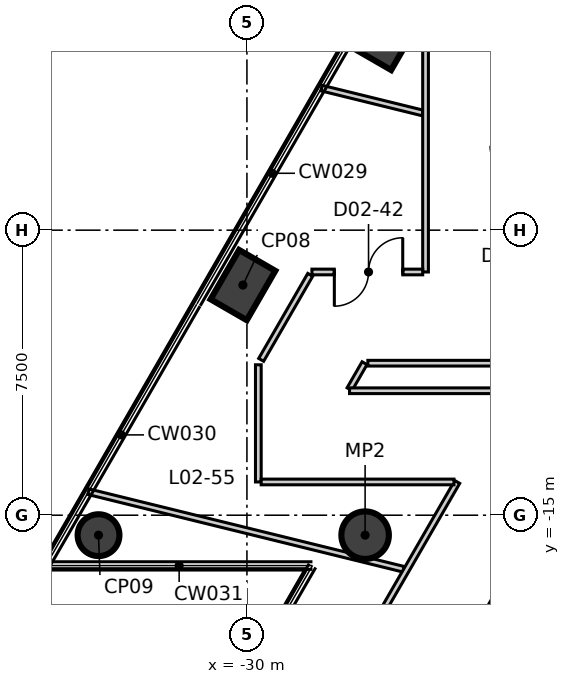
"""IFC4 building model, lengths in metres.
Left out: names, types, materials, properties, quantities, classifications, styles, units other than length and angle.
Written with IfcOpenShell. Run it as: python <this file> out.ifc"""

import sys

from ifc_helpers import new_model, si_unit, direction, frame, frame_2d, origin, origin_2d, place, context, subcontext, project, spatial, rectangle, circle, extrude, element, fill, save


model = new_model("IFC4")
c1 = context("Model", 3, precision=1e-05, world=origin(), true_north=direction((0.0, 1.0)))
c2 = subcontext(c1, "Body", "Model", "MODEL_VIEW")
j1 = project(units=[si_unit("LENGTHUNIT", "METRE"), si_unit("PLANEANGLEUNIT", "RADIAN")], contexts=[c1])
p1 = place(None, origin())
s1 = spatial("IfcSite", under=j1, at=p1, CompositionType="ELEMENT")
p2 = place(p1, origin())
s2 = spatial("IfcBuilding", under=s1, at=p2, CompositionType="ELEMENT")
p3 = place(p2, frame((0.0, 0.0, 14.5)))
s3 = spatial("IfcBuildingStorey", under=s2, at=p3, CompositionType="ELEMENT", Elevation=14.5)
for number, where, z_axis, x_axis in (
    (1, (-26.306, -2.362, -0.4), (0.0, 0.0, 1.0), (0.5, 0.866, 0.0)),
    (2, (-30.105, -8.944, -0.4), (0.0, 0.0, 1.0), (0.5, 0.866, 0.0)),
):
    element("IfcColumn", number, at=place(p3, frame(where, z_axis=z_axis, x_axis=x_axis)), inside=s3, PredefinedType="COLUMN", context=c2, shape_type="SweptSolid", body=[
        extrude(rectangle(XDim=1.5, YDim=1.1, at=origin_2d()), origin(), (0.0, 0.0, 1.0), 5.4),
    ])
p4 = place(p3, frame((-33.905, -15.525, -0.4), z_axis=(0.0, 0.0, 1.0), x_axis=(0.5, 0.866025403784, 0.0)))
e3 = element("IfcColumn", 3, at=p4, inside=s3, PredefinedType="COLUMN", context=c2, shape_type="SweptSolid", body=[
    extrude(circle(Radius=0.55, at=origin_2d()), origin(), (0.0, 0.0, 1.0), 5.4),
])
p5 = place(p3, frame((-26.89, -15.525, -0.4), z_axis=(0.0, 0.0, 1.0), x_axis=(1.0, 0.0, 0.0)))
e4 = element("IfcColumn", 4, at=p5, inside=s3, PredefinedType="COLUMN", context=c2, shape_type="SweptSolid", body=[
    extrude(circle(Radius=0.625, at=origin_2d()), origin(), (0.0, 0.0, 1.0), 5.4),
])
p6 = place(p3, frame((-34.169, -14.382, 0.0), z_axis=(0.0, 0.0, 1.0), x_axis=(0.971037336003, -0.238927796809, 0.0)))
e5 = element("IfcWall", 5, at=p6, inside=s3, PredefinedType="PARTITIONING", context=c2, shape_type="SweptSolid", body=[
    extrude(rectangle(XDim=8.538, YDim=0.15, at=frame_2d((4.269, 0.0))), origin(), (0.0, 0.0, 1.0), 4.1),
])
p7 = place(p3, frame((-29.358, -22.6, 0.0), z_axis=(0.0, 0.0, 1.0), x_axis=(0.499903869937, 0.866080897389, 0.0)))
e6 = element("IfcWall", 6, at=p7, inside=s3, PredefinedType="PARTITIONING", context=c2, shape_type="SweptSolid", body=[
    extrude(rectangle(XDim=9.786, YDim=0.15, at=frame_2d((4.893, 0.0))), origin(), (0.0, 0.0, 1.0), 5.0),
])
p8 = place(p7, frame((3.056, 0.0, 0.0)))
e7 = element("IfcOpeningElement", 7, at=p8, cuts=e6, PredefinedType="OPENING", context=c2, shape_type="SweptSolid", body=[
    extrude(rectangle(XDim=1.0, YDim=2.1, at=frame_2d((0.5, 1.05))), frame((0.0, 0.085, 0.0), z_axis=(0.0, -1.0, 0.0), x_axis=(1.0, 0.0, 0.0)), (0.0, 0.0, 1.0), 0.17),
])
p9 = place(p3, frame((-29.7, -14.125, 0.0), z_axis=(0.0, 0.0, 1.0), x_axis=(0.0, 1.0, 0.0)))
e8 = element("IfcWall", 8, at=p9, inside=s3, PredefinedType="PARTITIONING", context=c2, shape_type="SweptSolid", body=[
    extrude(rectangle(XDim=3.083, YDim=0.15, at=frame_2d((1.542, 0.0))), origin(), (0.0, 0.0, 1.0), 5.0),
])
p10 = place(p3, frame((-28.037, -3.761, 0.0), z_axis=(0.0, 0.0, 1.0), x_axis=(0.971036815216, -0.238929913355, 0.0)))
e9 = element("IfcWall", 9, at=p10, inside=s3, PredefinedType="PARTITIONING", context=c2, shape_type="SweptSolid", body=[
    extrude(rectangle(XDim=2.741, YDim=0.15, at=frame_2d((1.371, 0.0))), origin(), (0.0, 0.0, 1.0), 5.0),
])
p11 = place(p3, frame((-25.3, -8.6, 0.0), z_axis=(0.0, 0.0, 1.0), x_axis=(0.0, 1.0, 0.0)))
e10 = element("IfcWall", 10, at=p11, inside=s3, PredefinedType="PARTITIONING", context=c2, shape_type="SweptSolid", body=[
    extrude(rectangle(XDim=6.6, YDim=0.15, at=frame_2d((3.3, 0.0))), origin(), (0.0, 0.0, 1.0), 5.0),
])
p12 = place(p3, frame((-28.29, -8.6, 0.0), z_axis=(0.0, 0.0, 1.0), x_axis=(1.0, 0.0, 0.0)))
e11 = element("IfcWall", 11, at=p12, inside=s3, PredefinedType="PARTITIONING", context=c2, shape_type="SweptSolid", body=[
    extrude(rectangle(XDim=2.915, YDim=0.15, at=frame_2d((1.458, 0.0))), origin(), (0.0, 0.0, 1.0), 5.0),
])
p13 = place(p12, frame((0.59, 0.0, 0.0)))
e12 = element("IfcOpeningElement", 12, at=p13, cuts=e11, PredefinedType="OPENING", context=c2, shape_type="SweptSolid", body=[
    extrude(rectangle(XDim=1.8, YDim=2.1, at=frame_2d((0.9, 1.05))), frame((0.0, 0.085, 0.0), z_axis=(0.0, -1.0, 0.0), x_axis=(1.0, 0.0, 0.0)), (0.0, 0.0, 1.0), 0.17),
])
p14 = place(p3, frame((-29.625, -10.912, 0.0), z_axis=(0.0, 0.0, 1.0), x_axis=(0.499839737655, 0.866117911523, 0.0)))
e13 = element("IfcWall", 13, at=p14, inside=s3, PredefinedType="PARTITIONING", context=c2, shape_type="SweptSolid", body=[
    extrude(rectangle(XDim=2.583, YDim=0.15, at=frame_2d((1.292, 0.0))), origin(), (0.0, 0.0, 1.0), 5.0),
])
p15 = place(p3, frame((-29.625, -14.125, 0.0), z_axis=(0.0, 0.0, 1.0), x_axis=(1.0, 0.0, 0.0)))
e14 = element("IfcWall", 14, at=p15, inside=s3, PredefinedType="PARTITIONING", context=c2, shape_type="SweptSolid", body=[
    extrude(rectangle(XDim=5.073, YDim=0.15, at=frame_2d((2.537, 0.0))), origin(), (0.0, 0.0, 1.0), 5.0),
])
p16 = place(p3, frame((-27.3, -11.685, 0.0), z_axis=(0.0, 0.0, 1.0), x_axis=(0.499526442893, 0.866298639529, 0.0)))
e15 = element("IfcWall", 15, at=p16, inside=s3, PredefinedType="PARTITIONING", context=c2, shape_type="SweptSolid", body=[
    extrude(rectangle(XDim=0.791, YDim=0.15, at=frame_2d((0.396, 0.0))), origin(), (0.0, 0.0, 1.0), 5.0),
])
p17 = place(p3, frame((-26.818, -11.0, 0.0), z_axis=(0.0, 0.0, 1.0), x_axis=(1.0, 0.0, 0.0)))
e16 = element("IfcWall", 16, at=p17, inside=s3, PredefinedType="PARTITIONING", context=c2, shape_type="SweptSolid", body=[
    extrude(rectangle(XDim=11.818, YDim=0.15, at=frame_2d((5.909, 0.0))), origin(), (0.0, 0.0, 1.0), 5.0),
])
p18 = place(p17, frame((6.847, 0.0, 0.0)))
e17 = element("IfcOpeningElement", 17, at=p18, cuts=e16, PredefinedType="OPENING", context=c2, shape_type="SweptSolid", body=[
    extrude(rectangle(XDim=1.8, YDim=2.1, at=frame_2d((0.9, 1.05))), frame((0.0, 0.085, 0.0), z_axis=(0.0, -1.0, 0.0), x_axis=(1.0, 0.0, 0.0)), (0.0, 0.0, 1.0), 0.17),
])
p19 = place(p3, frame((-25.62, -20.925, 0.0), z_axis=(0.0, 0.0, 1.0), x_axis=(0.499960523757, 0.866048194205, 0.0)))
e18 = element("IfcWall", 18, at=p19, inside=s3, PredefinedType="PARTITIONING", context=c2, shape_type="SweptSolid", body=[
    extrude(rectangle(XDim=10.623, YDim=0.15, at=frame_2d((5.312, 0.0))), origin(), (0.0, 0.0, 1.0), 5.0),
])
p20 = place(p3, frame((-27.3, -11.725, 0.0), z_axis=(0.0, 0.0, 1.0), x_axis=(1.0, 0.0, 0.0)))
e19 = element("IfcWall", 19, at=p20, inside=s3, PredefinedType="PARTITIONING", context=c2, shape_type="SweptSolid", body=[
    extrude(rectangle(XDim=6.905, YDim=0.15, at=frame_2d((3.453, 0.0))), origin(), (0.0, 0.0, 1.0), 5.0),
])
p21 = place(p13, origin())
e20 = element("IfcDoor", 20, at=p21, inside=s3, OperationType="DOUBLE_DOOR_SINGLE_SWING", PredefinedType="DOOR", context=c2, shape_type="SweptSolid", body=[
    extrude(rectangle(XDim=1.8, YDim=2.1, at=frame_2d((0.9, 1.05))), frame((0.0, 0.025, 0.0), z_axis=(0.0, -1.0, 0.0), x_axis=(1.0, 0.0, 0.0)), (0.0, 0.0, 1.0), 0.05),
])
fill(e12, e20)
save(model, sys.argv[1])
